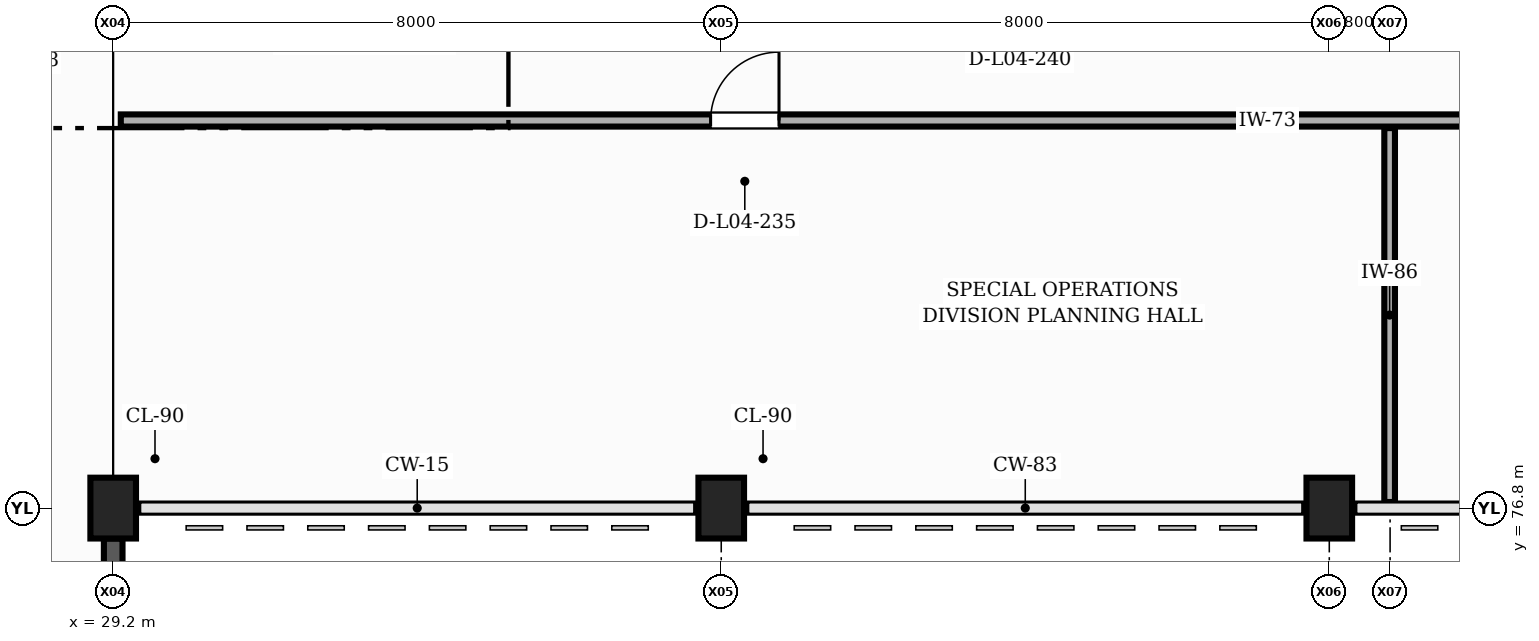
"""IFC4 building model, lengths in metres.
Left out: names, types, materials, properties, quantities, classifications, styles, units other than length and angle.
Written with IfcOpenShell. Run it as: python <this file> out.ifc"""

import sys

from ifc_helpers import new_model, si_unit, direction, frame, frame_2d, origin, origin_2d, place, context, subcontext, project, spatial, rectangle, extrude, element, fill, save


model = new_model("IFC4")
c1 = context("Model", 3, precision=1e-05, world=origin(), true_north=direction((0.0, 1.0)))
c2 = subcontext(c1, "Body", "Model", "MODEL_VIEW")
j1 = project(units=[si_unit("LENGTHUNIT", "METRE"), si_unit("PLANEANGLEUNIT", "RADIAN")], contexts=[c1])
p1 = place(None, origin())
s1 = spatial("IfcSite", under=j1, at=p1, CompositionType="ELEMENT")
p2 = place(p1, origin())
s2 = spatial("IfcBuilding", under=s1, at=p2, CompositionType="ELEMENT")
p3 = place(p2, frame((0.0, 0.0, 18.0)))
s3 = spatial("IfcBuildingStorey", under=s2, at=p3, CompositionType="ELEMENT", Elevation=18.0)
for number, where, z_axis, x_axis in (
    (1, (29.2, 76.8, 0.0), (0.0, 0.0, 1.0), (1.0, 0.0, 0.0)),
    (2, (37.2, 76.8, 0.0), (0.0, 0.0, 1.0), (1.0, 0.0, 0.0)),
    (3, (45.2, 76.8, 0.0), (0.0, 0.0, 1.0), (1.0, 0.0, 0.0)),
):
    element("IfcColumn", number, at=place(p3, frame(where, z_axis=z_axis, x_axis=x_axis)), inside=s3, PredefinedType="COLUMN", context=c2, shape_type="SweptSolid", body=[
        extrude(rectangle(XDim=0.6, YDim=0.8, at=origin_2d()), origin(), (0.0, 0.0, 1.0), 3.9),
    ])
p4 = place(p3, frame((29.2, 69.05, 0.0), z_axis=(0.0, 0.0, 1.0), x_axis=(0.0, 1.0, 0.0)))
e4 = element("IfcWall", 4, at=p4, inside=s3, PredefinedType="SOLIDWALL", context=c2, shape_type="SweptSolid", body=[
    extrude(rectangle(XDim=7.35, YDim=0.245, at=frame_2d((3.675, 0.0))), origin(), (0.0, 0.0, 1.0), 2.99),
])
p5 = place(p4, frame((2.475, 0.0, 0.9)))
e5 = element("IfcOpeningElement", 5, at=p5, cuts=e4, PredefinedType="OPENING", context=c2, shape_type="SweptSolid", body=[
    extrude(rectangle(XDim=2.4, YDim=1.5, at=frame_2d((1.2, 0.75))), frame((0.0, 0.133, 0.0), z_axis=(0.0, -1.0, 0.0), x_axis=(1.0, 0.0, 0.0)), (0.0, 0.0, 1.0), 0.265),
])
p6 = place(p3, frame((45.994, 76.88, 0.0), z_axis=(0.0, 0.0, 1.0), x_axis=(0.0, 1.0, 0.0)))
e6 = element("IfcWall", 6, at=p6, inside=s3, PredefinedType="PARTITIONING", context=c2, shape_type="SweptSolid", body=[
    extrude(rectangle(XDim=4.92, YDim=0.14, at=frame_2d((2.46, 0.0))), origin(), (0.0, 0.0, 1.0), 2.975),
])
p7 = place(p3, frame((29.3, 81.9, 0.0), z_axis=(0.0, 0.0, 1.0), x_axis=(1.0, 0.0, 0.0)))
e7 = element("IfcWall", 7, at=p7, inside=s3, PredefinedType="PARTITIONING", context=c2, shape_type="SweptSolid", body=[
    extrude(rectangle(XDim=64.62, YDim=0.16, at=frame_2d((32.31, 0.0))), origin(), (0.0, 0.0, 1.0), 2.975),
])
p8 = place(p7, frame((7.76, 0.0, 0.0)))
e8 = element("IfcOpeningElement", 8, at=p8, cuts=e7, PredefinedType="OPENING", context=c2, shape_type="SweptSolid", body=[
    extrude(rectangle(XDim=0.9, YDim=2.1, at=frame_2d((0.45, 1.05))), frame((0.0, 0.09, 0.0), z_axis=(0.0, -1.0, 0.0), x_axis=(1.0, 0.0, 0.0)), (0.0, 0.0, 1.0), 0.18),
])
p9 = place(p7, frame((22.32, 0.0, 0.0)))
e9 = element("IfcOpeningElement", 9, at=p9, cuts=e7, PredefinedType="OPENING", context=c2, shape_type="SweptSolid", body=[
    extrude(rectangle(XDim=0.92, YDim=2.1, at=frame_2d((0.46, 1.05))), frame((0.0, 0.09, 0.0), z_axis=(0.0, -1.0, 0.0), x_axis=(1.0, 0.0, 0.0)), (0.0, 0.0, 1.0), 0.18),
])
p10 = place(p7, frame((35.28, 0.0, 0.0)))
e10 = element("IfcOpeningElement", 10, at=p10, cuts=e7, PredefinedType="OPENING", context=c2, shape_type="SweptSolid", body=[
    extrude(rectangle(XDim=0.95, YDim=2.1, at=frame_2d((0.475, 1.05))), frame((0.0, 0.09, 0.0), z_axis=(0.0, -1.0, 0.0), x_axis=(1.0, 0.0, 0.0)), (0.0, 0.0, 1.0), 0.18),
])
p11 = place(p7, frame((47.73, 0.0, 0.0)))
e11 = element("IfcOpeningElement", 11, at=p11, cuts=e7, PredefinedType="OPENING", context=c2, shape_type="SweptSolid", body=[
    extrude(rectangle(XDim=0.98, YDim=2.12, at=frame_2d((0.49, 1.06))), frame((0.0, 0.09, 0.0), z_axis=(0.0, -1.0, 0.0), x_axis=(1.0, 0.0, 0.0)), (0.0, 0.0, 1.0), 0.18),
])
p12 = place(p7, frame((58.65, 0.0, 0.0)))
e12 = element("IfcOpeningElement", 12, at=p12, cuts=e7, PredefinedType="OPENING", context=c2, shape_type="SweptSolid", body=[
    extrude(rectangle(XDim=1.0, YDim=2.1, at=frame_2d((0.5, 1.05))), frame((0.0, 0.09, 0.0), z_axis=(0.0, -1.0, 0.0), x_axis=(1.0, 0.0, 0.0)), (0.0, 0.0, 1.0), 0.18),
])
p13 = place(p8, origin())
e13 = element("IfcDoor", 13, at=p13, inside=s3, OperationType="SINGLE_SWING_RIGHT", PredefinedType="DOOR", context=c2, shape_type="SweptSolid", body=[
    extrude(rectangle(XDim=0.9, YDim=2.1, at=frame_2d((0.45, 1.05))), frame((0.0, 0.025, 0.0), z_axis=(0.0, -1.0, 0.0), x_axis=(1.0, 0.0, 0.0)), (0.0, 0.0, 1.0), 0.05),
])
fill(e8, e13)
save(model, sys.argv[1])
